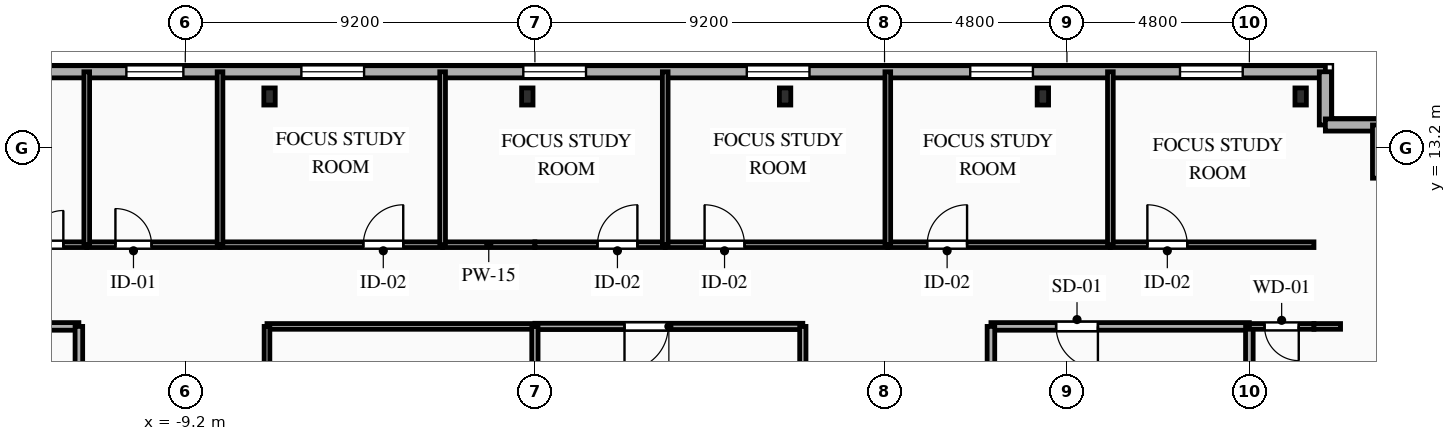
"""IFC4 building model, lengths in metres.
Left out: names, types, materials, properties, quantities, classifications, styles, units other than length and angle.
Written with IfcOpenShell. Run it as: python <this file> out.ifc"""

import sys

from ifc_helpers import new_model, si_unit, direction, frame, frame_2d, origin, origin_2d, place, context, subcontext, project, spatial, rectangle, i_section, extrude, element, fill, save


model = new_model("IFC4")
c1 = context("Model", 3, precision=1e-05, world=origin(), true_north=direction((0.0, 1.0)))
c2 = subcontext(c1, "Body", "Model", "MODEL_VIEW")
j1 = project(units=[si_unit("LENGTHUNIT", "METRE"), si_unit("PLANEANGLEUNIT", "RADIAN")], contexts=[c1])
p1 = place(None, origin())
s1 = spatial("IfcSite", under=j1, at=p1, CompositionType="ELEMENT")
p2 = place(p1, origin())
s2 = spatial("IfcBuilding", under=s1, at=p2, CompositionType="ELEMENT")
p3 = place(p2, frame((0.0, 0.0, 241.7)))
s3 = spatial("IfcBuildingStorey", under=s2, at=p3, CompositionType="ELEMENT", Elevation=241.7)
for number, where, z_axis, x_axis in (
    (1, (20.15, 14.55, 0.0), (0.0, 0.0, 1.0), (1.0, 0.0, 0.0)),
    (2, (13.367, 14.55, 0.0), (0.0, 0.0, 1.0), (1.0, 0.0, 0.0)),
    (3, (6.583, 14.55, 0.0), (0.0, 0.0, 1.0), (1.0, 0.0, 0.0)),
    (4, (-0.2, 14.55, 0.0), (0.0, 0.0, 1.0), (1.0, 0.0, 0.0)),
    (5, (-6.983, 14.55, 0.0), (0.0, 0.0, 1.0), (1.0, 0.0, 0.0)),
):
    element("IfcColumn", number, at=place(p3, frame(where, z_axis=z_axis, x_axis=x_axis)), inside=s3, PredefinedType="COLUMN", context=c2, shape_type="SweptSolid", body=[
        extrude(i_section(OverallWidth=0.3, OverallDepth=0.45, WebThickness=0.014, FlangeThickness=0.026, FilletRadius=0.027, at=origin_2d()), origin(), (0.0, 0.0, 1.0), 3.35),
    ])
p4 = place(p3, frame((-21.2, 15.2, 0.0), z_axis=(0.0, 0.0, 1.0), x_axis=(1.0, 0.0, 0.0)))
e6 = element("IfcWall", 6, at=p4, inside=s3, PredefinedType="SOLIDWALL", context=c2, shape_type="SweptSolid", body=[
    extrude(rectangle(XDim=42.0, YDim=0.32, at=frame_2d((21.0, 0.0))), origin(), (0.0, 0.0, 1.0), 3.04),
])
p5 = place(p4, frame((3.095, 0.0, 0.85)))
e7 = element("IfcOpeningElement", 7, at=p5, cuts=e6, PredefinedType="OPENING", context=c2, shape_type="SweptSolid", body=[
    extrude(rectangle(XDim=1.65, YDim=1.85, at=frame_2d((0.825, 0.925))), frame((0.0, 0.17, 0.0), z_axis=(0.0, -1.0, 0.0), x_axis=(1.0, 0.0, 0.0)), (0.0, 0.0, 1.0), 0.34),
])
p6 = place(p4, frame((10.45, 0.0, 0.85)))
e8 = element("IfcOpeningElement", 8, at=p6, cuts=e6, PredefinedType="OPENING", context=c2, shape_type="SweptSolid", body=[
    extrude(rectangle(XDim=1.5, YDim=1.85, at=frame_2d((0.75, 0.925))), frame((0.0, 0.17, 0.0), z_axis=(0.0, -1.0, 0.0), x_axis=(1.0, 0.0, 0.0)), (0.0, 0.0, 1.0), 0.34),
])
p7 = place(p4, frame((15.055, 0.0, 0.85)))
e9 = element("IfcOpeningElement", 9, at=p7, cuts=e6, PredefinedType="OPENING", context=c2, shape_type="SweptSolid", body=[
    extrude(rectangle(XDim=1.65, YDim=1.85, at=frame_2d((0.825, 0.925))), frame((0.0, 0.17, 0.0), z_axis=(0.0, -1.0, 0.0), x_axis=(1.0, 0.0, 0.0)), (0.0, 0.0, 1.0), 0.34),
])
p8 = place(p4, frame((20.895, 0.0, 0.85)))
e10 = element("IfcOpeningElement", 10, at=p8, cuts=e6, PredefinedType="OPENING", context=c2, shape_type="SweptSolid", body=[
    extrude(rectangle(XDim=1.65, YDim=1.85, at=frame_2d((0.825, 0.925))), frame((0.0, 0.17, 0.0), z_axis=(0.0, -1.0, 0.0), x_axis=(1.0, 0.0, 0.0)), (0.0, 0.0, 1.0), 0.34),
])
p9 = place(p4, frame((26.775, 0.0, 0.85)))
e11 = element("IfcOpeningElement", 11, at=p9, cuts=e6, PredefinedType="OPENING", context=c2, shape_type="SweptSolid", body=[
    extrude(rectangle(XDim=1.65, YDim=1.85, at=frame_2d((0.825, 0.925))), frame((0.0, 0.17, 0.0), z_axis=(0.0, -1.0, 0.0), x_axis=(1.0, 0.0, 0.0)), (0.0, 0.0, 1.0), 0.34),
])
p10 = place(p4, frame((32.655, 0.0, 0.85)))
e12 = element("IfcOpeningElement", 12, at=p10, cuts=e6, PredefinedType="OPENING", context=c2, shape_type="SweptSolid", body=[
    extrude(rectangle(XDim=1.65, YDim=1.85, at=frame_2d((0.825, 0.925))), frame((0.0, 0.17, 0.0), z_axis=(0.0, -1.0, 0.0), x_axis=(1.0, 0.0, 0.0)), (0.0, 0.0, 1.0), 0.34),
])
p11 = place(p4, frame((38.175, 0.0, 0.85)))
e13 = element("IfcOpeningElement", 13, at=p11, cuts=e6, PredefinedType="OPENING", context=c2, shape_type="SweptSolid", body=[
    extrude(rectangle(XDim=1.65, YDim=1.85, at=frame_2d((0.825, 0.925))), frame((0.0, 0.17, 0.0), z_axis=(0.0, -1.0, 0.0), x_axis=(1.0, 0.0, 0.0)), (0.0, 0.0, 1.0), 0.34),
])
for number, where, z_axis, x_axis in (
    (14, (20.8, 15.2, 0.0), (0.0, 0.0, 1.0), (0.0, -1.0, 0.0)),
    (15, (20.8, 13.8, 0.0), (0.0, 0.0, 1.0), (1.0, 0.0, 0.0)),
):
    element("IfcWall", number, at=place(p3, frame(where, z_axis=z_axis, x_axis=x_axis)), inside=s3, PredefinedType="SOLIDWALL", context=c2, shape_type="SweptSolid", body=[
        extrude(rectangle(XDim=1.4, YDim=0.32, at=frame_2d((0.7, 0.0))), origin(), (0.0, 0.0, 1.0), 3.04),
    ])
p12 = place(p3, frame((22.2, 13.8, 0.0), z_axis=(0.0, 0.0, 1.0), x_axis=(0.0, -1.0, 0.0)))
e16 = element("IfcWall", 16, at=p12, inside=s3, PredefinedType="SOLIDWALL", context=c2, shape_type="SweptSolid", body=[
    extrude(rectangle(XDim=1.4, YDim=0.32, at=frame_2d((0.7, 0.0))), origin(), (0.0, 0.0, 1.0), 3.04),
])
p13 = place(p3, frame((-12.0, 8.5, 0.0), z_axis=(0.0, 0.0, 1.0), x_axis=(-1.0, 0.0, 0.0)))
e17 = element("IfcWall", 17, at=p13, inside=s3, PredefinedType="PARTITIONING", context=c2, shape_type="SweptSolid", body=[
    extrude(rectangle(XDim=6.8, YDim=0.2, at=frame_2d((3.4, 0.0))), origin(), (0.0, 0.0, 1.0), 3.04),
])
p14 = place(p13, frame((1.715, 0.0, 0.0)))
e18 = element("IfcOpeningElement", 18, at=p14, cuts=e17, PredefinedType="OPENING", context=c2, shape_type="SweptSolid", body=[
    extrude(rectangle(XDim=1.1, YDim=2.15, at=frame_2d((0.55, 1.075))), frame((0.0, 0.11, 0.0), z_axis=(0.0, -1.0, 0.0), x_axis=(1.0, 0.0, 0.0)), (0.0, 0.0, 1.0), 0.22),
])
p15 = place(p3, frame((-12.0, 5.6, 0.0), z_axis=(0.0, 0.0, 1.0), x_axis=(0.0, 1.0, 0.0)))
e19 = element("IfcWall", 19, at=p15, inside=s3, PredefinedType="PARTITIONING", context=c2, shape_type="SweptSolid", body=[
    extrude(rectangle(XDim=2.9, YDim=0.2, at=frame_2d((1.45, 0.0))), origin(), (0.0, 0.0, 1.0), 3.04),
])
p16 = place(p3, frame((18.8, 8.5, 0.0), z_axis=(0.0, 0.0, 1.0), x_axis=(-1.0, 0.0, 0.0)))
e20 = element("IfcWall", 20, at=p16, inside=s3, PredefinedType="PARTITIONING", context=c2, shape_type="SweptSolid", body=[
    extrude(rectangle(XDim=6.8, YDim=0.2, at=frame_2d((3.4, 0.0))), origin(), (0.0, 0.0, 1.0), 3.04),
])
p17 = place(p16, frame((3.985, 0.0, 0.0)))
e21 = element("IfcOpeningElement", 21, at=p17, cuts=e20, PredefinedType="OPENING", context=c2, shape_type="SweptSolid", body=[
    extrude(rectangle(XDim=1.1, YDim=2.15, at=frame_2d((0.55, 1.075))), frame((0.0, 0.11, 0.0), z_axis=(0.0, -1.0, 0.0), x_axis=(1.0, 0.0, 0.0)), (0.0, 0.0, 1.0), 0.22),
])
p18 = place(p3, frame((12.0, 8.5, 0.0), z_axis=(0.0, 0.0, 1.0), x_axis=(0.0, -1.0, 0.0)))
e22 = element("IfcWall", 22, at=p18, inside=s3, PredefinedType="PARTITIONING", context=c2, shape_type="SweptSolid", body=[
    extrude(rectangle(XDim=2.9, YDim=0.2, at=frame_2d((1.45, 0.0))), origin(), (0.0, 0.0, 1.0), 3.04),
])
p19 = place(p3, frame((18.8, 5.6, 0.0), z_axis=(0.0, 0.0, 1.0), x_axis=(0.0, 1.0, 0.0)))
e23 = element("IfcWall", 23, at=p19, inside=s3, PredefinedType="PARTITIONING", context=c2, shape_type="SweptSolid", body=[
    extrude(rectangle(XDim=2.9, YDim=0.2, at=frame_2d((1.45, 0.0))), origin(), (0.0, 0.0, 1.0), 2.665),
])
p20 = place(p3, frame((-14.143, 10.65, 0.0), z_axis=(0.0, 0.0, 1.0), x_axis=(1.0, 0.0, 0.0)))
e24 = element("IfcWall", 24, at=p20, inside=s3, PredefinedType="PLUMBINGWALL", context=c2, shape_type="SweptSolid", body=[
    extrude(rectangle(XDim=2.35, YDim=0.15, at=frame_2d((1.175, 0.0))), origin(), (0.0, 0.0, 1.0), 3.04),
])
p21 = place(p20, frame((0.834, 0.0, 0.0)))
e25 = element("IfcOpeningElement", 25, at=p21, cuts=e24, PredefinedType="OPENING", context=c2, shape_type="SweptSolid", body=[
    extrude(rectangle(XDim=0.9, YDim=2.1, at=frame_2d((0.45, 1.05))), frame((0.0, 0.085, 0.0), z_axis=(0.0, -1.0, 0.0), x_axis=(1.0, 0.0, 0.0)), (0.0, 0.0, 1.0), 0.17),
])
p22 = place(p3, frame((-11.793, 10.65, 0.0), z_axis=(0.0, 0.0, 1.0), x_axis=(1.0, 0.0, 0.0)))
e26 = element("IfcWall", 26, at=p22, inside=s3, PredefinedType="PARTITIONING", context=c2, shape_type="SweptSolid", body=[
    extrude(rectangle(XDim=3.507, YDim=0.15, at=frame_2d((1.753, 0.0))), origin(), (0.0, 0.0, 1.0), 3.04),
])
p23 = place(p22, frame((0.755, 0.0, 0.0)))
e27 = element("IfcOpeningElement", 27, at=p23, cuts=e26, PredefinedType="OPENING", context=c2, shape_type="SweptSolid", body=[
    extrude(rectangle(XDim=0.95, YDim=2.1, at=frame_2d((0.475, 1.05))), frame((0.0, 0.085, 0.0), z_axis=(0.0, -1.0, 0.0), x_axis=(1.0, 0.0, 0.0)), (0.0, 0.0, 1.0), 0.17),
])
p24 = place(p3, frame((-8.286, 10.65, 0.0), z_axis=(0.0, 0.0, 1.0), x_axis=(1.0, 0.0, 0.0)))
e28 = element("IfcWall", 28, at=p24, inside=s3, PredefinedType="PARTITIONING", context=c2, shape_type="SweptSolid", body=[
    extrude(rectangle(XDim=5.857, YDim=0.15, at=frame_2d((2.928, 0.0))), origin(), (0.0, 0.0, 1.0), 3.04),
])
p25 = place(p24, frame((3.771, 0.0, 0.0)))
e29 = element("IfcOpeningElement", 29, at=p25, cuts=e28, PredefinedType="OPENING", context=c2, shape_type="SweptSolid", body=[
    extrude(rectangle(XDim=1.05, YDim=2.15, at=frame_2d((0.525, 1.075))), frame((0.0, 0.085, 0.0), z_axis=(0.0, -1.0, 0.0), x_axis=(1.0, 0.0, 0.0)), (0.0, 0.0, 1.0), 0.17),
])
p26 = place(p3, frame((-2.429, 10.65, 0.0), z_axis=(0.0, 0.0, 1.0), x_axis=(1.0, 0.0, 0.0)))
e30 = element("IfcWall", 30, at=p26, inside=s3, PredefinedType="PARTITIONING", context=c2, shape_type="SweptSolid", body=[
    extrude(rectangle(XDim=2.429, YDim=0.15, at=frame_2d((1.214, 0.0))), origin(), (0.0, 0.0, 1.0), 3.04),
])
p27 = place(p3, frame((0.0, 8.5, 0.0), z_axis=(0.0, 0.0, 1.0), x_axis=(-1.0, 0.0, 0.0)))
e31 = element("IfcWall", 31, at=p27, inside=s3, PredefinedType="PARTITIONING", context=c2, shape_type="SweptSolid", body=[
    extrude(rectangle(XDim=7.05, YDim=0.15, at=frame_2d((3.525, 0.0))), origin(), (0.0, 0.0, 1.0), 3.04),
])
p28 = place(p3, frame((20.5, 8.5, 0.0), z_axis=(0.0, 0.0, 1.0), x_axis=(-1.0, 0.0, 0.0)))
e32 = element("IfcWall", 32, at=p28, inside=s3, PredefinedType="PARTITIONING", context=c2, shape_type="SweptSolid", body=[
    extrude(rectangle(XDim=1.7, YDim=0.15, at=frame_2d((0.85, 0.0))), origin(), (0.0, 0.0, 1.0), 3.04),
])
p29 = place(p28, frame((0.4, 0.0, 0.0)))
e33 = element("IfcOpeningElement", 33, at=p29, cuts=e32, PredefinedType="OPENING", context=c2, shape_type="SweptSolid", body=[
    extrude(rectangle(XDim=0.9, YDim=2.1, at=frame_2d((0.45, 1.05))), frame((0.0, 0.085, 0.0), z_axis=(0.0, -1.0, 0.0), x_axis=(1.0, 0.0, 0.0)), (0.0, 0.0, 1.0), 0.17),
])
p30 = place(p3, frame((21.2, 8.5, 0.0), z_axis=(0.0, 0.0, 1.0), x_axis=(-1.0, 0.0, 0.0)))
e34 = element("IfcWall", 34, at=p30, inside=s3, PredefinedType="PARTITIONING", context=c2, shape_type="SweptSolid", body=[
    extrude(rectangle(XDim=0.7, YDim=0.15, at=frame_2d((0.35, 0.0))), origin(), (0.0, 0.0, 1.0), 3.04),
])
p31 = place(p3, frame((0.0, 10.65, 0.0), z_axis=(0.0, 0.0, 1.0), x_axis=(1.0, 0.0, 0.0)))
e35 = element("IfcWall", 35, at=p31, inside=s3, PredefinedType="PARTITIONING", context=c2, shape_type="SweptSolid", body=[
    extrude(rectangle(XDim=3.429, YDim=0.15, at=frame_2d((1.714, 0.0))), origin(), (0.0, 0.0, 1.0), 3.04),
])
p32 = place(p31, frame((1.646, 0.0, 0.0)))
e36 = element("IfcOpeningElement", 36, at=p32, cuts=e35, PredefinedType="OPENING", context=c2, shape_type="SweptSolid", body=[
    extrude(rectangle(XDim=1.05, YDim=2.15, at=frame_2d((0.525, 1.075))), frame((0.0, 0.085, 0.0), z_axis=(0.0, -1.0, 0.0), x_axis=(1.0, 0.0, 0.0)), (0.0, 0.0, 1.0), 0.17),
])
p33 = place(p3, frame((3.429, 10.65, 0.0), z_axis=(0.0, 0.0, 1.0), x_axis=(1.0, 0.0, 0.0)))
e37 = element("IfcWall", 37, at=p33, inside=s3, PredefinedType="PARTITIONING", context=c2, shape_type="SweptSolid", body=[
    extrude(rectangle(XDim=5.857, YDim=0.15, at=frame_2d((2.928, 0.0))), origin(), (0.0, 0.0, 1.0), 3.04),
])
p34 = place(p33, frame((1.036, 0.0, 0.0)))
e38 = element("IfcOpeningElement", 38, at=p34, cuts=e37, PredefinedType="OPENING", context=c2, shape_type="SweptSolid", body=[
    extrude(rectangle(XDim=1.05, YDim=2.15, at=frame_2d((0.525, 1.075))), frame((0.0, 0.085, 0.0), z_axis=(0.0, -1.0, 0.0), x_axis=(1.0, 0.0, 0.0)), (0.0, 0.0, 1.0), 0.17),
])
p35 = place(p3, frame((9.286, 10.65, 0.0), z_axis=(0.0, 0.0, 1.0), x_axis=(1.0, 0.0, 0.0)))
e39 = element("IfcWall", 39, at=p35, inside=s3, PredefinedType="PARTITIONING", context=c2, shape_type="SweptSolid", body=[
    extrude(rectangle(XDim=5.857, YDim=0.15, at=frame_2d((2.929, 0.0))), origin(), (0.0, 0.0, 1.0), 3.04),
])
p36 = place(p35, frame((1.036, 0.0, 0.0)))
e40 = element("IfcOpeningElement", 40, at=p36, cuts=e39, PredefinedType="OPENING", context=c2, shape_type="SweptSolid", body=[
    extrude(rectangle(XDim=1.05, YDim=2.15, at=frame_2d((0.525, 1.075))), frame((0.0, 0.085, 0.0), z_axis=(0.0, -1.0, 0.0), x_axis=(1.0, 0.0, 0.0)), (0.0, 0.0, 1.0), 0.17),
])
p37 = place(p3, frame((15.143, 10.65, 0.0), z_axis=(0.0, 0.0, 1.0), x_axis=(1.0, 0.0, 0.0)))
e41 = element("IfcWall", 41, at=p37, inside=s3, PredefinedType="PARTITIONING", context=c2, shape_type="SweptSolid", body=[
    extrude(rectangle(XDim=5.357, YDim=0.15, at=frame_2d((2.678, 0.0))), origin(), (0.0, 0.0, 1.0), 3.04),
])
p38 = place(p37, frame((0.973, 0.0, 0.0)))
e42 = element("IfcOpeningElement", 42, at=p38, cuts=e41, PredefinedType="OPENING", context=c2, shape_type="SweptSolid", body=[
    extrude(rectangle(XDim=1.05, YDim=2.15, at=frame_2d((0.525, 1.075))), frame((0.0, 0.085, 0.0), z_axis=(0.0, -1.0, 0.0), x_axis=(1.0, 0.0, 0.0)), (0.0, 0.0, 1.0), 0.17),
])
p39 = place(p3, frame((7.05, 8.5, 0.0), z_axis=(0.0, 0.0, 1.0), x_axis=(-1.0, 0.0, 0.0)))
e43 = element("IfcWall", 43, at=p39, inside=s3, PredefinedType="PARTITIONING", context=c2, shape_type="SweptSolid", body=[
    extrude(rectangle(XDim=7.05, YDim=0.165, at=frame_2d((3.525, 0.0))), origin(), (0.0, 0.0, 1.0), 3.04),
])
p40 = place(p39, frame((3.542, 0.0, 0.0)))
e44 = element("IfcOpeningElement", 44, at=p40, cuts=e43, PredefinedType="OPENING", context=c2, shape_type="SweptSolid", body=[
    extrude(rectangle(XDim=1.15, YDim=2.15, at=frame_2d((0.575, 1.075))), frame((0.0, 0.093, 0.0), z_axis=(0.0, -1.0, 0.0), x_axis=(1.0, 0.0, 0.0)), (0.0, 0.0, 1.0), 0.185),
])
p41 = place(p3, frame((-7.05, 8.5, 0.0), z_axis=(0.0, 0.0, 1.0), x_axis=(0.0, -1.0, 0.0)))
e45 = element("IfcWall", 45, at=p41, inside=s3, PredefinedType="PARTITIONING", context=c2, shape_type="SweptSolid", body=[
    extrude(rectangle(XDim=14.1, YDim=0.15, at=frame_2d((7.05, 0.0))), origin(), (0.0, 0.0, 1.0), 3.04),
])
p42 = place(p41, frame((8.011, 0.0, 0.0)))
e46 = element("IfcOpeningElement", 46, at=p42, cuts=e45, PredefinedType="OPENING", context=c2, shape_type="SweptSolid", body=[
    extrude(rectangle(XDim=1.05, YDim=2.15, at=frame_2d((0.525, 1.075))), frame((0.0, 0.085, 0.0), z_axis=(0.0, -1.0, 0.0), x_axis=(1.0, 0.0, 0.0)), (0.0, 0.0, 1.0), 0.17),
])
p43 = place(p3, frame((7.05, 1.45, 0.0), z_axis=(0.0, 0.0, 1.0), x_axis=(0.0, 1.0, 0.0)))
e47 = element("IfcWall", 47, at=p43, inside=s3, PredefinedType="PARTITIONING", context=c2, shape_type="SweptSolid", body=[
    extrude(rectangle(XDim=7.05, YDim=0.165, at=frame_2d((3.525, 0.0))), origin(), (0.0, 0.0, 1.0), 3.04),
])
p44 = place(p3, frame((-11.793, 15.2, 0.0), z_axis=(0.0, 0.0, 1.0), x_axis=(0.0, -1.0, 0.0)))
e48 = element("IfcWall", 48, at=p44, inside=s3, PredefinedType="PLUMBINGWALL", context=c2, shape_type="SweptSolid", body=[
    extrude(rectangle(XDim=4.55, YDim=0.15, at=frame_2d((2.275, 0.0))), origin(), (0.0, 0.0, 1.0), 3.04),
])
for number, where, z_axis, x_axis in (
    (49, (-8.286, 15.2, 0.0), (0.0, 0.0, 1.0), (0.0, -1.0, 0.0)),
    (50, (-2.429, 15.2, 0.0), (0.0, 0.0, 1.0), (0.0, -1.0, 0.0)),
    (51, (3.429, 15.2, 0.0), (0.0, 0.0, 1.0), (0.0, -1.0, 0.0)),
    (52, (9.286, 15.2, 0.0), (0.0, 0.0, 1.0), (0.0, -1.0, 0.0)),
    (53, (15.143, 15.2, 0.0), (0.0, 0.0, 1.0), (0.0, -1.0, 0.0)),
):
    element("IfcWall", number, at=place(p3, frame(where, z_axis=z_axis, x_axis=x_axis)), inside=s3, PredefinedType="PARTITIONING", context=c2, shape_type="SweptSolid", body=[
        extrude(rectangle(XDim=4.55, YDim=0.15, at=frame_2d((2.275, 0.0))), origin(), (0.0, 0.0, 1.0), 3.04),
    ])
p45 = place(p3, frame((0.0, 8.5, 0.0), z_axis=(0.0, 0.0, 1.0), x_axis=(0.0, -1.0, 0.0)))
e54 = element("IfcWall", 54, at=p45, inside=s3, PredefinedType="PARTITIONING", context=c2, shape_type="SweptSolid", body=[
    extrude(rectangle(XDim=7.05, YDim=0.165, at=frame_2d((3.525, 0.0))), origin(), (0.0, 0.0, 1.0), 3.04),
])
p46 = place(p6, origin())
e55 = element("IfcWindow", 55, at=p46, inside=s3, PartitioningType="SINGLE_PANEL", PredefinedType="WINDOW", context=c2, shape_type="SweptSolid", body=[
    extrude(rectangle(XDim=1.5, YDim=1.85, at=frame_2d((0.75, 0.925))), frame((0.0, 0.03, 0.0), z_axis=(0.0, -1.0, 0.0), x_axis=(1.0, 0.0, 0.0)), (0.0, 0.0, 1.0), 0.06),
])
fill(e8, e55)
p47 = place(p7, origin())
e56 = element("IfcWindow", 56, at=p47, inside=s3, PartitioningType="SINGLE_PANEL", PredefinedType="WINDOW", context=c2, shape_type="SweptSolid", body=[
    extrude(rectangle(XDim=1.65, YDim=1.85, at=frame_2d((0.825, 0.925))), frame((0.0, 0.03, 0.0), z_axis=(0.0, -1.0, 0.0), x_axis=(1.0, 0.0, 0.0)), (0.0, 0.0, 1.0), 0.06),
])
fill(e9, e56)
p48 = place(p8, origin())
e57 = element("IfcWindow", 57, at=p48, inside=s3, PartitioningType="SINGLE_PANEL", PredefinedType="WINDOW", context=c2, shape_type="SweptSolid", body=[
    extrude(rectangle(XDim=1.65, YDim=1.85, at=frame_2d((0.825, 0.925))), frame((0.0, 0.03, 0.0), z_axis=(0.0, -1.0, 0.0), x_axis=(1.0, 0.0, 0.0)), (0.0, 0.0, 1.0), 0.06),
])
fill(e10, e57)
p49 = place(p9, origin())
e58 = element("IfcWindow", 58, at=p49, inside=s3, PartitioningType="SINGLE_PANEL", PredefinedType="WINDOW", context=c2, shape_type="SweptSolid", body=[
    extrude(rectangle(XDim=1.65, YDim=1.85, at=frame_2d((0.825, 0.925))), frame((0.0, 0.03, 0.0), z_axis=(0.0, -1.0, 0.0), x_axis=(1.0, 0.0, 0.0)), (0.0, 0.0, 1.0), 0.06),
])
fill(e11, e58)
p50 = place(p10, origin())
e59 = element("IfcWindow", 59, at=p50, inside=s3, PartitioningType="SINGLE_PANEL", PredefinedType="WINDOW", context=c2, shape_type="SweptSolid", body=[
    extrude(rectangle(XDim=1.65, YDim=1.85, at=frame_2d((0.825, 0.925))), frame((0.0, 0.03, 0.0), z_axis=(0.0, -1.0, 0.0), x_axis=(1.0, 0.0, 0.0)), (0.0, 0.0, 1.0), 0.06),
])
fill(e12, e59)
p51 = place(p11, origin())
e60 = element("IfcWindow", 60, at=p51, inside=s3, PartitioningType="SINGLE_PANEL", PredefinedType="WINDOW", context=c2, shape_type="SweptSolid", body=[
    extrude(rectangle(XDim=1.65, YDim=1.85, at=frame_2d((0.825, 0.925))), frame((0.0, 0.03, 0.0), z_axis=(0.0, -1.0, 0.0), x_axis=(1.0, 0.0, 0.0)), (0.0, 0.0, 1.0), 0.06),
])
fill(e13, e60)
p52 = place(p17, origin())
e61 = element("IfcDoor", 61, at=p52, inside=s3, OperationType="SINGLE_SWING_LEFT", PredefinedType="DOOR", context=c2, shape_type="SweptSolid", body=[
    extrude(rectangle(XDim=1.1, YDim=2.15, at=frame_2d((0.55, 1.075))), frame((0.0, 0.025, 0.0), z_axis=(0.0, -1.0, 0.0), x_axis=(1.0, 0.0, 0.0)), (0.0, 0.0, 1.0), 0.05),
])
fill(e21, e61)
p53 = place(p21, origin())
e62 = element("IfcDoor", 62, at=p53, inside=s3, OperationType="SINGLE_SWING_RIGHT", PredefinedType="DOOR", context=c2, shape_type="SweptSolid", body=[
    extrude(rectangle(XDim=0.9, YDim=2.1, at=frame_2d((0.45, 1.05))), frame((0.0, 0.025, 0.0), z_axis=(0.0, -1.0, 0.0), x_axis=(1.0, 0.0, 0.0)), (0.0, 0.0, 1.0), 0.05),
])
fill(e25, e62)
p54 = place(p23, origin())
e63 = element("IfcDoor", 63, at=p54, inside=s3, OperationType="SINGLE_SWING_LEFT", PredefinedType="DOOR", context=c2, shape_type="SweptSolid", body=[
    extrude(rectangle(XDim=0.95, YDim=2.1, at=frame_2d((0.475, 1.05))), frame((0.0, 0.025, 0.0), z_axis=(0.0, -1.0, 0.0), x_axis=(1.0, 0.0, 0.0)), (0.0, 0.0, 1.0), 0.05),
])
fill(e27, e63)
p55 = place(p25, origin())
e64 = element("IfcDoor", 64, at=p55, inside=s3, OperationType="SINGLE_SWING_RIGHT", PredefinedType="DOOR", context=c2, shape_type="SweptSolid", body=[
    extrude(rectangle(XDim=1.05, YDim=2.15, at=frame_2d((0.525, 1.075))), frame((0.0, 0.025, 0.0), z_axis=(0.0, -1.0, 0.0), x_axis=(1.0, 0.0, 0.0)), (0.0, 0.0, 1.0), 0.05),
])
fill(e29, e64)
p56 = place(p29, origin())
e65 = element("IfcDoor", 65, at=p56, inside=s3, OperationType="SINGLE_SWING_LEFT", PredefinedType="DOOR", context=c2, shape_type="SweptSolid", body=[
    extrude(rectangle(XDim=0.9, YDim=2.1, at=frame_2d((0.45, 1.05))), frame((0.0, 0.025, 0.0), z_axis=(0.0, -1.0, 0.0), x_axis=(1.0, 0.0, 0.0)), (0.0, 0.0, 1.0), 0.05),
])
fill(e33, e65)
p57 = place(p32, origin())
e66 = element("IfcDoor", 66, at=p57, inside=s3, OperationType="SINGLE_SWING_RIGHT", PredefinedType="DOOR", context=c2, shape_type="SweptSolid", body=[
    extrude(rectangle(XDim=1.05, YDim=2.15, at=frame_2d((0.525, 1.075))), frame((0.0, 0.025, 0.0), z_axis=(0.0, -1.0, 0.0), x_axis=(1.0, 0.0, 0.0)), (0.0, 0.0, 1.0), 0.05),
])
fill(e36, e66)
p58 = place(p34, origin())
e67 = element("IfcDoor", 67, at=p58, inside=s3, OperationType="SINGLE_SWING_LEFT", PredefinedType="DOOR", context=c2, shape_type="SweptSolid", body=[
    extrude(rectangle(XDim=1.05, YDim=2.15, at=frame_2d((0.525, 1.075))), frame((0.0, 0.025, 0.0), z_axis=(0.0, -1.0, 0.0), x_axis=(1.0, 0.0, 0.0)), (0.0, 0.0, 1.0), 0.05),
])
fill(e38, e67)
p59 = place(p36, origin())
e68 = element("IfcDoor", 68, at=p59, inside=s3, OperationType="SINGLE_SWING_RIGHT", PredefinedType="DOOR", context=c2, shape_type="SweptSolid", body=[
    extrude(rectangle(XDim=1.05, YDim=2.15, at=frame_2d((0.525, 1.075))), frame((0.0, 0.025, 0.0), z_axis=(0.0, -1.0, 0.0), x_axis=(1.0, 0.0, 0.0)), (0.0, 0.0, 1.0), 0.05),
])
fill(e40, e68)
p60 = place(p38, origin())
e69 = element("IfcDoor", 69, at=p60, inside=s3, OperationType="SINGLE_SWING_LEFT", PredefinedType="DOOR", context=c2, shape_type="SweptSolid", body=[
    extrude(rectangle(XDim=1.05, YDim=2.15, at=frame_2d((0.525, 1.075))), frame((0.0, 0.025, 0.0), z_axis=(0.0, -1.0, 0.0), x_axis=(1.0, 0.0, 0.0)), (0.0, 0.0, 1.0), 0.05),
])
fill(e42, e69)
p61 = place(p40, origin())
e70 = element("IfcDoor", 70, at=p61, inside=s3, OperationType="SINGLE_SWING_RIGHT", PredefinedType="DOOR", context=c2, shape_type="SweptSolid", body=[
    extrude(rectangle(XDim=1.15, YDim=2.15, at=frame_2d((0.575, 1.075))), frame((0.0, 0.025, 0.0), z_axis=(0.0, -1.0, 0.0), x_axis=(1.0, 0.0, 0.0)), (0.0, 0.0, 1.0), 0.05),
])
fill(e44, e70)
save(model, sys.argv[1])
